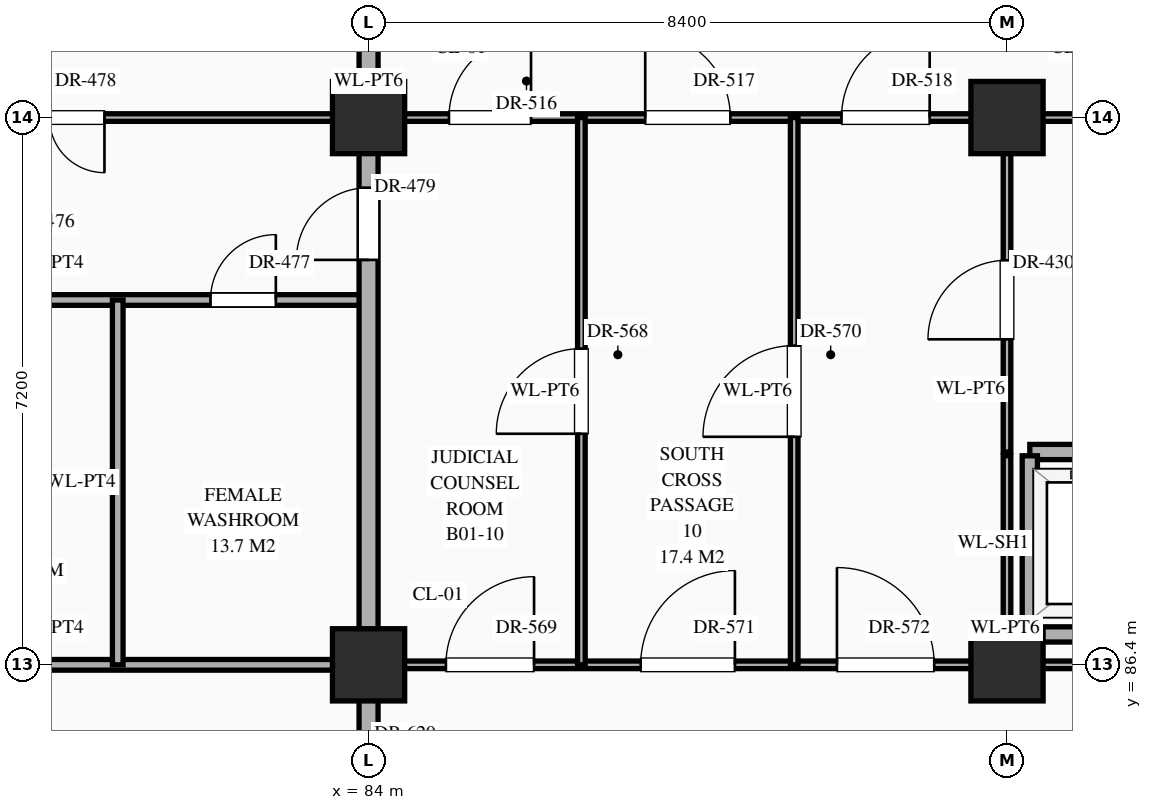
"""IFC4 building model, lengths in metres.
Left out: names, types, materials, properties, quantities, classifications, styles, units other than length and angle.
Written with IfcOpenShell. Run it as: python <this file> out.ifc"""

import sys

from ifc_helpers import new_model, si_unit, direction, frame, frame_2d, origin, origin_2d, place, context, subcontext, project, spatial, rectangle, extrude, element, fill, save


model = new_model("IFC4")
c1 = context("Model", 3, precision=1e-05, world=origin(), true_north=direction((0.0, 1.0)))
c2 = subcontext(c1, "Body", "Model", "MODEL_VIEW")
j1 = project(units=[si_unit("LENGTHUNIT", "METRE"), si_unit("PLANEANGLEUNIT", "RADIAN")], contexts=[c1])
p1 = place(None, origin())
s1 = spatial("IfcSite", under=j1, at=p1, CompositionType="ELEMENT")
p2 = place(p1, origin())
s2 = spatial("IfcBuilding", under=s1, at=p2, CompositionType="ELEMENT")
p3 = place(p2, frame((0.0, 0.0, -5.4)))
s3 = spatial("IfcBuildingStorey", under=s2, at=p3, CompositionType="ELEMENT", Elevation=-5.4)
for number, where, z_axis, x_axis in (
    (1, (84.0, 86.4, 0.0), (0.0, 0.0, 1.0), (1.0, 0.0, 0.0)),
    (2, (84.0, 93.6, 0.0), (0.0, 0.0, 1.0), (1.0, 0.0, 0.0)),
    (3, (92.4, 86.4, 0.0), (0.0, 0.0, 1.0), (1.0, 0.0, 0.0)),
    (4, (92.4, 93.6, 0.0), (0.0, 0.0, 1.0), (1.0, 0.0, 0.0)),
):
    element("IfcColumn", number, at=place(p3, frame(where, z_axis=z_axis, x_axis=x_axis)), inside=s3, PredefinedType="COLUMN", context=c2, shape_type="SweptSolid", body=[
        extrude(rectangle(XDim=0.95, YDim=0.95, at=origin_2d()), origin(), (0.0, 0.0, 1.0), 5.4),
    ])
p4 = place(p3, frame((75.6, 86.4, 0.0), z_axis=(0.0, 0.0, 1.0), x_axis=(1.0, 0.0, 0.0)))
e5 = element("IfcWall", 5, at=p4, inside=s3, PredefinedType="STANDARD", context=c2, shape_type="SweptSolid", body=[
    extrude(rectangle(XDim=8.4, YDim=0.14, at=frame_2d((4.2, 0.0))), origin(), (0.0, 0.0, 1.0), 4.25),
])
p5 = place(p3, frame((84.0, 86.4, 0.0), z_axis=(0.0, 0.0, 1.0), x_axis=(1.0, 0.0, 0.0)))
e6 = element("IfcWall", 6, at=p5, inside=s3, PredefinedType="STANDARD", context=c2, shape_type="SweptSolid", body=[
    extrude(rectangle(XDim=8.4, YDim=0.1, at=frame_2d((4.2, 0.0))), origin(), (0.0, 0.0, 1.0), 4.25),
])
p6 = place(p5, frame((1.018, 0.0, 0.0)))
e7 = element("IfcOpeningElement", 7, at=p6, cuts=e6, PredefinedType="OPENING", context=c2, shape_type="SweptSolid", body=[
    extrude(rectangle(XDim=1.16, YDim=2.3, at=frame_2d((0.58, 1.15))), frame((0.0, 0.062, 0.0), z_axis=(0.0, -1.0, 0.0), x_axis=(1.0, 0.0, 0.0)), (0.0, 0.0, 1.0), 0.124),
])
p7 = place(p5, frame((3.58, 0.0, 0.0)))
e8 = element("IfcOpeningElement", 8, at=p7, cuts=e6, PredefinedType="OPENING", context=c2, shape_type="SweptSolid", body=[
    extrude(rectangle(XDim=1.24, YDim=2.3, at=frame_2d((0.62, 1.15))), frame((0.0, 0.062, 0.0), z_axis=(0.0, -1.0, 0.0), x_axis=(1.0, 0.0, 0.0)), (0.0, 0.0, 1.0), 0.124),
])
p8 = place(p5, frame((6.163, 0.0, 0.0)))
e9 = element("IfcOpeningElement", 9, at=p8, cuts=e6, PredefinedType="OPENING", context=c2, shape_type="SweptSolid", body=[
    extrude(rectangle(XDim=1.28, YDim=2.35, at=frame_2d((0.64, 1.175))), frame((0.0, 0.062, 0.0), z_axis=(0.0, -1.0, 0.0), x_axis=(1.0, 0.0, 0.0)), (0.0, 0.0, 1.0), 0.124),
])
p9 = place(p3, frame((92.45, 86.4, 0.0), z_axis=(0.0, 0.0, 1.0), x_axis=(1.0, 0.0, 0.0)))
e10 = element("IfcWall", 10, at=p9, inside=s3, PredefinedType="STANDARD", context=c2, shape_type="SweptSolid", body=[
    extrude(rectangle(XDim=8.3, YDim=0.1, at=frame_2d((4.15, 0.0))), origin(), (0.0, 0.0, 1.0), 4.25),
])
p10 = place(p3, frame((92.7, 86.8, 0.0), z_axis=(0.0, 0.0, 1.0), x_axis=(1.0, 0.0, 0.0)))
e11 = element("IfcWall", 11, at=p10, inside=s3, PredefinedType="STANDARD", context=c2, shape_type="SweptSolid", body=[
    extrude(rectangle(XDim=2.5, YDim=0.2, at=frame_2d((1.25, 0.0))), origin(), (0.0, 0.0, 1.0), 5.1),
])
p11 = place(p3, frame((92.7, 89.2, 0.0), z_axis=(0.0, 0.0, 1.0), x_axis=(1.0, 0.0, 0.0)))
e12 = element("IfcWall", 12, at=p11, inside=s3, PredefinedType="STANDARD", context=c2, shape_type="SweptSolid", body=[
    extrude(rectangle(XDim=7.7, YDim=0.2, at=frame_2d((3.85, 0.0))), origin(), (0.0, 0.0, 1.0), 5.1),
])
p12 = place(p11, frame((0.725, 0.0, 0.0)))
e13 = element("IfcOpeningElement", 13, at=p12, cuts=e12, PredefinedType="OPENING", context=c2, shape_type="SweptSolid", body=[
    extrude(rectangle(XDim=1.1, YDim=2.15, at=frame_2d((0.55, 1.075))), frame((0.0, 0.112, 0.0), z_axis=(0.0, -1.0, 0.0), x_axis=(1.0, 0.0, 0.0)), (0.0, 0.0, 1.0), 0.224),
])
p13 = place(p11, frame((3.3, 0.0, 0.0)))
e14 = element("IfcOpeningElement", 14, at=p13, cuts=e12, PredefinedType="OPENING", context=c2, shape_type="SweptSolid", body=[
    extrude(rectangle(XDim=1.1, YDim=2.15, at=frame_2d((0.55, 1.075))), frame((0.0, 0.112, 0.0), z_axis=(0.0, -1.0, 0.0), x_axis=(1.0, 0.0, 0.0)), (0.0, 0.0, 1.0), 0.224),
])
p14 = place(p11, frame((5.875, 0.0, 0.0)))
e15 = element("IfcOpeningElement", 15, at=p14, cuts=e12, PredefinedType="OPENING", context=c2, shape_type="SweptSolid", body=[
    extrude(rectangle(XDim=1.1, YDim=2.15, at=frame_2d((0.55, 1.075))), frame((0.0, 0.112, 0.0), z_axis=(0.0, -1.0, 0.0), x_axis=(1.0, 0.0, 0.0)), (0.0, 0.0, 1.0), 0.224),
])
p15 = place(p3, frame((75.6, 91.2, 0.0), z_axis=(0.0, 0.0, 1.0), x_axis=(1.0, 0.0, 0.0)))
e16 = element("IfcWall", 16, at=p15, inside=s3, PredefinedType="STANDARD", context=c2, shape_type="SweptSolid", body=[
    extrude(rectangle(XDim=8.4, YDim=0.14, at=frame_2d((4.2, 0.0))), origin(), (0.0, 0.0, 1.0), 5.1),
])
p16 = place(p15, frame((0.65, 0.0, 0.0)))
e17 = element("IfcOpeningElement", 17, at=p16, cuts=e16, PredefinedType="OPENING", context=c2, shape_type="SweptSolid", body=[
    extrude(rectangle(XDim=0.9, YDim=2.15, at=frame_2d((0.45, 1.075))), frame((0.0, 0.082, 0.0), z_axis=(0.0, -1.0, 0.0), x_axis=(1.0, 0.0, 0.0)), (0.0, 0.0, 1.0), 0.164),
])
p17 = place(p15, frame((3.22, 0.0, 0.0)))
e18 = element("IfcOpeningElement", 18, at=p17, cuts=e16, PredefinedType="OPENING", context=c2, shape_type="SweptSolid", body=[
    extrude(rectangle(XDim=0.86, YDim=2.1, at=frame_2d((0.43, 1.05))), frame((0.0, 0.082, 0.0), z_axis=(0.0, -1.0, 0.0), x_axis=(1.0, 0.0, 0.0)), (0.0, 0.0, 1.0), 0.164),
])
p18 = place(p15, frame((6.32, 0.0, 0.0)))
e19 = element("IfcOpeningElement", 19, at=p18, cuts=e16, PredefinedType="OPENING", context=c2, shape_type="SweptSolid", body=[
    extrude(rectangle(XDim=0.86, YDim=2.1, at=frame_2d((0.43, 1.05))), frame((0.0, 0.082, 0.0), z_axis=(0.0, -1.0, 0.0), x_axis=(1.0, 0.0, 0.0)), (0.0, 0.0, 1.0), 0.164),
])
p19 = place(p3, frame((67.2, 93.6, 0.0), z_axis=(0.0, 0.0, 1.0), x_axis=(1.0, 0.0, 0.0)))
e20 = element("IfcWall", 20, at=p19, inside=s3, PredefinedType="STANDARD", context=c2, shape_type="SweptSolid", body=[
    extrude(rectangle(XDim=33.6, YDim=0.1, at=frame_2d((16.8, 0.0))), origin(), (0.0, 0.0, 1.0), 4.25),
])
p20 = place(p19, frame((3.425, 0.0, 0.0)))
e21 = element("IfcOpeningElement", 21, at=p20, cuts=e20, PredefinedType="OPENING", context=c2, shape_type="SweptSolid", body=[
    extrude(rectangle(XDim=1.55, YDim=2.35, at=frame_2d((0.775, 1.175))), frame((0.0, 0.062, 0.0), z_axis=(0.0, -1.0, 0.0), x_axis=(1.0, 0.0, 0.0)), (0.0, 0.0, 1.0), 0.124),
])
p21 = place(p19, frame((28.55, 0.0, 0.0)))
e22 = element("IfcOpeningElement", 22, at=p21, cuts=e20, PredefinedType="OPENING", context=c2, shape_type="SweptSolid", body=[
    extrude(rectangle(XDim=1.7, YDim=2.45, at=frame_2d((0.85, 1.225))), frame((0.0, 0.062, 0.0), z_axis=(0.0, -1.0, 0.0), x_axis=(1.0, 0.0, 0.0)), (0.0, 0.0, 1.0), 0.124),
])
p22 = place(p19, frame((11.875, 0.0, 0.0)))
e23 = element("IfcOpeningElement", 23, at=p22, cuts=e20, PredefinedType="OPENING", context=c2, shape_type="SweptSolid", body=[
    extrude(rectangle(XDim=1.45, YDim=2.3, at=frame_2d((0.725, 1.15))), frame((0.0, 0.062, 0.0), z_axis=(0.0, -1.0, 0.0), x_axis=(1.0, 0.0, 0.0)), (0.0, 0.0, 1.0), 0.124),
])
p23 = place(p19, frame((17.857, 0.0, 0.0)))
e24 = element("IfcOpeningElement", 24, at=p23, cuts=e20, PredefinedType="OPENING", context=c2, shape_type="SweptSolid", body=[
    extrude(rectangle(XDim=1.08, YDim=2.25, at=frame_2d((0.54, 1.125))), frame((0.0, 0.062, 0.0), z_axis=(0.0, -1.0, 0.0), x_axis=(1.0, 0.0, 0.0)), (0.0, 0.0, 1.0), 0.124),
])
p24 = place(p19, frame((20.44, 0.0, 0.0)))
e25 = element("IfcOpeningElement", 25, at=p24, cuts=e20, PredefinedType="OPENING", context=c2, shape_type="SweptSolid", body=[
    extrude(rectangle(XDim=1.12, YDim=2.25, at=frame_2d((0.56, 1.125))), frame((0.0, 0.062, 0.0), z_axis=(0.0, -1.0, 0.0), x_axis=(1.0, 0.0, 0.0)), (0.0, 0.0, 1.0), 0.124),
])
p25 = place(p19, frame((23.022, 0.0, 0.0)))
e26 = element("IfcOpeningElement", 26, at=p25, cuts=e20, PredefinedType="OPENING", context=c2, shape_type="SweptSolid", body=[
    extrude(rectangle(XDim=1.16, YDim=2.3, at=frame_2d((0.58, 1.15))), frame((0.0, 0.062, 0.0), z_axis=(0.0, -1.0, 0.0), x_axis=(1.0, 0.0, 0.0)), (0.0, 0.0, 1.0), 0.124),
])
p26 = place(p3, frame((80.7, 86.4, 0.0), z_axis=(0.0, 0.0, 1.0), x_axis=(0.0, 1.0, 0.0)))
e27 = element("IfcWall", 27, at=p26, inside=s3, PredefinedType="STANDARD", context=c2, shape_type="SweptSolid", body=[
    extrude(rectangle(XDim=4.8, YDim=0.14, at=frame_2d((2.4, 0.0))), origin(), (0.0, 0.0, 1.0), 5.1),
])
p27 = place(p3, frame((84.0, 79.2, 0.0), z_axis=(0.0, 0.0, 1.0), x_axis=(0.0, 1.0, 0.0)))
e28 = element("IfcWall", 28, at=p27, inside=s3, PredefinedType="STANDARD", context=c2, shape_type="SweptSolid", body=[
    extrude(rectangle(XDim=35.96, YDim=0.25, at=frame_2d((17.98, 0.0))), origin(), (0.0, 0.0, 1.0), 4.35),
])
p28 = place(p27, frame((22.798, 0.0, 0.0)))
e29 = element("IfcOpeningElement", 29, at=p28, cuts=e28, PredefinedType="OPENING", context=c2, shape_type="SweptSolid", body=[
    extrude(rectangle(XDim=1.6, YDim=2.3, at=frame_2d((0.8, 1.15))), frame((0.0, 0.137, 0.0), z_axis=(0.0, -1.0, 0.0), x_axis=(1.0, 0.0, 0.0)), (0.0, 0.0, 1.0), 0.274),
])
p29 = place(p27, frame((12.528, 0.0, 0.0)))
e30 = element("IfcOpeningElement", 30, at=p29, cuts=e28, PredefinedType="OPENING", context=c2, shape_type="SweptSolid", body=[
    extrude(rectangle(XDim=0.95, YDim=2.15, at=frame_2d((0.475, 1.075))), frame((0.0, 0.137, 0.0), z_axis=(0.0, -1.0, 0.0), x_axis=(1.0, 0.0, 0.0)), (0.0, 0.0, 1.0), 0.274),
])
p30 = place(p27, frame((15.323, 0.0, 0.0)))
e31 = element("IfcOpeningElement", 31, at=p30, cuts=e28, PredefinedType="OPENING", context=c2, shape_type="SweptSolid", body=[
    extrude(rectangle(XDim=0.95, YDim=2.15, at=frame_2d((0.475, 1.075))), frame((0.0, 0.137, 0.0), z_axis=(0.0, -1.0, 0.0), x_axis=(1.0, 0.0, 0.0)), (0.0, 0.0, 1.0), 0.274),
])
p31 = place(p27, frame((25.903, 0.0, 0.0)))
e32 = element("IfcOpeningElement", 32, at=p31, cuts=e28, PredefinedType="OPENING", context=c2, shape_type="SweptSolid", body=[
    extrude(rectangle(XDim=1.8, YDim=2.35, at=frame_2d((0.9, 1.175))), frame((0.0, 0.137, 0.0), z_axis=(0.0, -1.0, 0.0), x_axis=(1.0, 0.0, 0.0)), (0.0, 0.0, 1.0), 0.274),
])
p32 = place(p27, frame((29.722, 0.0, 0.0)))
e33 = element("IfcOpeningElement", 33, at=p32, cuts=e28, PredefinedType="OPENING", context=c2, shape_type="SweptSolid", body=[
    extrude(rectangle(XDim=0.95, YDim=2.15, at=frame_2d((0.475, 1.075))), frame((0.0, 0.137, 0.0), z_axis=(0.0, -1.0, 0.0), x_axis=(1.0, 0.0, 0.0)), (0.0, 0.0, 1.0), 0.274),
])
p33 = place(p27, frame((5.327, 0.0, 0.0)))
e34 = element("IfcOpeningElement", 34, at=p33, cuts=e28, PredefinedType="OPENING", context=c2, shape_type="SweptSolid", body=[
    extrude(rectangle(XDim=0.95, YDim=2.15, at=frame_2d((0.475, 1.075))), frame((0.0, 0.137, 0.0), z_axis=(0.0, -1.0, 0.0), x_axis=(1.0, 0.0, 0.0)), (0.0, 0.0, 1.0), 0.274),
])
p34 = place(p3, frame((86.8, 86.4, 0.0), z_axis=(0.0, 0.0, 1.0), x_axis=(0.0, 1.0, 0.0)))
e35 = element("IfcWall", 35, at=p34, inside=s3, PredefinedType="STANDARD", context=c2, shape_type="SweptSolid", body=[
    extrude(rectangle(XDim=7.2, YDim=0.1, at=frame_2d((3.6, 0.0))), origin(), (0.0, 0.0, 1.0), 5.1),
])
p35 = place(p34, frame((3.04, 0.0, 0.0)))
e36 = element("IfcOpeningElement", 36, at=p35, cuts=e35, PredefinedType="OPENING", context=c2, shape_type="SweptSolid", body=[
    extrude(rectangle(XDim=1.12, YDim=2.25, at=frame_2d((0.56, 1.125))), frame((0.0, 0.062, 0.0), z_axis=(0.0, -1.0, 0.0), x_axis=(1.0, 0.0, 0.0)), (0.0, 0.0, 1.0), 0.124),
])
p36 = place(p3, frame((89.6, 86.4, 0.0), z_axis=(0.0, 0.0, 1.0), x_axis=(0.0, 1.0, 0.0)))
e37 = element("IfcWall", 37, at=p36, inside=s3, PredefinedType="STANDARD", context=c2, shape_type="SweptSolid", body=[
    extrude(rectangle(XDim=7.2, YDim=0.1, at=frame_2d((3.6, 0.0))), origin(), (0.0, 0.0, 1.0), 5.1),
])
p37 = place(p36, frame((3.0, 0.0, 0.0)))
e38 = element("IfcOpeningElement", 38, at=p37, cuts=e37, PredefinedType="OPENING", context=c2, shape_type="SweptSolid", body=[
    extrude(rectangle(XDim=1.2, YDim=2.35, at=frame_2d((0.6, 1.175))), frame((0.0, 0.062, 0.0), z_axis=(0.0, -1.0, 0.0), x_axis=(1.0, 0.0, 0.0)), (0.0, 0.0, 1.0), 0.124),
])
p38 = place(p3, frame((92.4, 86.45, 0.0), z_axis=(0.0, 0.0, 1.0), x_axis=(0.0, 1.0, 0.0)))
e39 = element("IfcWall", 39, at=p38, inside=s3, PredefinedType="STANDARD", context=c2, shape_type="SweptSolid", body=[
    extrude(rectangle(XDim=2.7, YDim=0.1, at=frame_2d((1.35, 0.0))), origin(), (0.0, 0.0, 1.0), 4.35),
])
p39 = place(p3, frame((92.4, 89.2, 0.0), z_axis=(0.0, 0.0, 1.0), x_axis=(0.0, 1.0, 0.0)))
e40 = element("IfcWall", 40, at=p39, inside=s3, PredefinedType="STANDARD", context=c2, shape_type="SweptSolid", body=[
    extrude(rectangle(XDim=4.4, YDim=0.1, at=frame_2d((2.2, 0.0))), origin(), (0.0, 0.0, 1.0), 4.35),
])
p40 = place(p39, frame((1.482, 0.0, 0.0)))
e41 = element("IfcOpeningElement", 41, at=p40, cuts=e40, PredefinedType="OPENING", context=c2, shape_type="SweptSolid", body=[
    extrude(rectangle(XDim=1.04, YDim=2.2, at=frame_2d((0.52, 1.1))), frame((0.0, 0.062, 0.0), z_axis=(0.0, -1.0, 0.0), x_axis=(1.0, 0.0, 0.0)), (0.0, 0.0, 1.0), 0.124),
])
p41 = place(p3, frame((92.7, 86.85, 0.0), z_axis=(0.0, 0.0, 1.0), x_axis=(0.0, 1.0, 0.0)))
e42 = element("IfcWall", 42, at=p41, inside=s3, PredefinedType="STANDARD", context=c2, shape_type="SweptSolid", body=[
    extrude(rectangle(XDim=2.3, YDim=0.2, at=frame_2d((1.15, 0.0))), origin(), (0.0, 0.0, 1.0), 5.1),
])
p42 = place(p40, origin())
e43 = element("IfcDoor", 43, at=p42, inside=s3, OperationType="SINGLE_SWING_LEFT", PredefinedType="DOOR", context=c2, shape_type="SweptSolid", body=[
    extrude(rectangle(XDim=1.04, YDim=2.2, at=frame_2d((0.52, 1.1))), frame((0.0, 0.025, 0.0), z_axis=(0.0, -1.0, 0.0), x_axis=(1.0, 0.0, 0.0)), (0.0, 0.0, 1.0), 0.05),
])
fill(e41, e43)
p43 = place(p18, origin())
e44 = element("IfcDoor", 44, at=p43, inside=s3, OperationType="SINGLE_SWING_RIGHT", PredefinedType="DOOR", context=c2, shape_type="SweptSolid", body=[
    extrude(rectangle(XDim=0.86, YDim=2.1, at=frame_2d((0.43, 1.05))), frame((0.0, 0.025, 0.0), z_axis=(0.0, -1.0, 0.0), x_axis=(1.0, 0.0, 0.0)), (0.0, 0.0, 1.0), 0.05),
])
fill(e19, e44)
p44 = place(p22, frame((1.45, 0.0, 0.0), z_axis=(0.0, 0.0, 1.0), x_axis=(-1.0, 0.0, 0.0)))
e45 = element("IfcDoor", 45, at=p44, inside=s3, OperationType="DOUBLE_DOOR_SINGLE_SWING", PredefinedType="DOOR", context=c2, shape_type="SweptSolid", body=[
    extrude(rectangle(XDim=1.45, YDim=2.3, at=frame_2d((0.725, 1.15))), frame((0.0, 0.025, 0.0), z_axis=(0.0, -1.0, 0.0), x_axis=(1.0, 0.0, 0.0)), (0.0, 0.0, 1.0), 0.05),
])
fill(e23, e45)
p45 = place(p29, origin())
e46 = element("IfcDoor", 46, at=p45, inside=s3, OperationType="SINGLE_SWING_LEFT", PredefinedType="DOOR", context=c2, shape_type="SweptSolid", body=[
    extrude(rectangle(XDim=0.95, YDim=2.15, at=frame_2d((0.475, 1.075))), frame((0.0, 0.025, 0.0), z_axis=(0.0, -1.0, 0.0), x_axis=(1.0, 0.0, 0.0)), (0.0, 0.0, 1.0), 0.05),
])
fill(e30, e46)
p46 = place(p23, origin())
e47 = element("IfcDoor", 47, at=p46, inside=s3, OperationType="SINGLE_SWING_RIGHT", PredefinedType="DOOR", context=c2, shape_type="SweptSolid", body=[
    extrude(rectangle(XDim=1.08, YDim=2.25, at=frame_2d((0.54, 1.125))), frame((0.0, 0.025, 0.0), z_axis=(0.0, -1.0, 0.0), x_axis=(1.0, 0.0, 0.0)), (0.0, 0.0, 1.0), 0.05),
])
fill(e24, e47)
p47 = place(p24, origin())
e48 = element("IfcDoor", 48, at=p47, inside=s3, OperationType="SINGLE_SWING_LEFT", PredefinedType="DOOR", context=c2, shape_type="SweptSolid", body=[
    extrude(rectangle(XDim=1.12, YDim=2.25, at=frame_2d((0.56, 1.125))), frame((0.0, 0.025, 0.0), z_axis=(0.0, -1.0, 0.0), x_axis=(1.0, 0.0, 0.0)), (0.0, 0.0, 1.0), 0.05),
])
fill(e25, e48)
p48 = place(p25, origin())
e49 = element("IfcDoor", 49, at=p48, inside=s3, OperationType="SINGLE_SWING_RIGHT", PredefinedType="DOOR", context=c2, shape_type="SweptSolid", body=[
    extrude(rectangle(XDim=1.16, YDim=2.3, at=frame_2d((0.58, 1.15))), frame((0.0, 0.025, 0.0), z_axis=(0.0, -1.0, 0.0), x_axis=(1.0, 0.0, 0.0)), (0.0, 0.0, 1.0), 0.05),
])
fill(e26, e49)
p49 = place(p35, origin())
e50 = element("IfcDoor", 50, at=p49, inside=s3, OperationType="SINGLE_SWING_LEFT", PredefinedType="DOOR", context=c2, shape_type="SweptSolid", body=[
    extrude(rectangle(XDim=1.12, YDim=2.25, at=frame_2d((0.56, 1.125))), frame((0.0, 0.025, 0.0), z_axis=(0.0, -1.0, 0.0), x_axis=(1.0, 0.0, 0.0)), (0.0, 0.0, 1.0), 0.05),
])
fill(e36, e50)
p50 = place(p6, origin())
e51 = element("IfcDoor", 51, at=p50, inside=s3, OperationType="SINGLE_SWING_RIGHT", PredefinedType="DOOR", context=c2, shape_type="SweptSolid", body=[
    extrude(rectangle(XDim=1.16, YDim=2.3, at=frame_2d((0.58, 1.15))), frame((0.0, 0.025, 0.0), z_axis=(0.0, -1.0, 0.0), x_axis=(1.0, 0.0, 0.0)), (0.0, 0.0, 1.0), 0.05),
])
fill(e7, e51)
p51 = place(p37, origin())
e52 = element("IfcDoor", 52, at=p51, inside=s3, OperationType="SINGLE_SWING_LEFT", PredefinedType="DOOR", context=c2, shape_type="SweptSolid", body=[
    extrude(rectangle(XDim=1.2, YDim=2.35, at=frame_2d((0.6, 1.175))), frame((0.0, 0.025, 0.0), z_axis=(0.0, -1.0, 0.0), x_axis=(1.0, 0.0, 0.0)), (0.0, 0.0, 1.0), 0.05),
])
fill(e38, e52)
p52 = place(p7, origin())
e53 = element("IfcDoor", 53, at=p52, inside=s3, OperationType="SINGLE_SWING_RIGHT", PredefinedType="DOOR", context=c2, shape_type="SweptSolid", body=[
    extrude(rectangle(XDim=1.24, YDim=2.3, at=frame_2d((0.62, 1.15))), frame((0.0, 0.025, 0.0), z_axis=(0.0, -1.0, 0.0), x_axis=(1.0, 0.0, 0.0)), (0.0, 0.0, 1.0), 0.05),
])
fill(e8, e53)
p53 = place(p8, origin())
e54 = element("IfcDoor", 54, at=p53, inside=s3, OperationType="SINGLE_SWING_LEFT", PredefinedType="DOOR", context=c2, shape_type="SweptSolid", body=[
    extrude(rectangle(XDim=1.28, YDim=2.35, at=frame_2d((0.64, 1.175))), frame((0.0, 0.025, 0.0), z_axis=(0.0, -1.0, 0.0), x_axis=(1.0, 0.0, 0.0)), (0.0, 0.0, 1.0), 0.05),
])
fill(e9, e54)
save(model, sys.argv[1])
